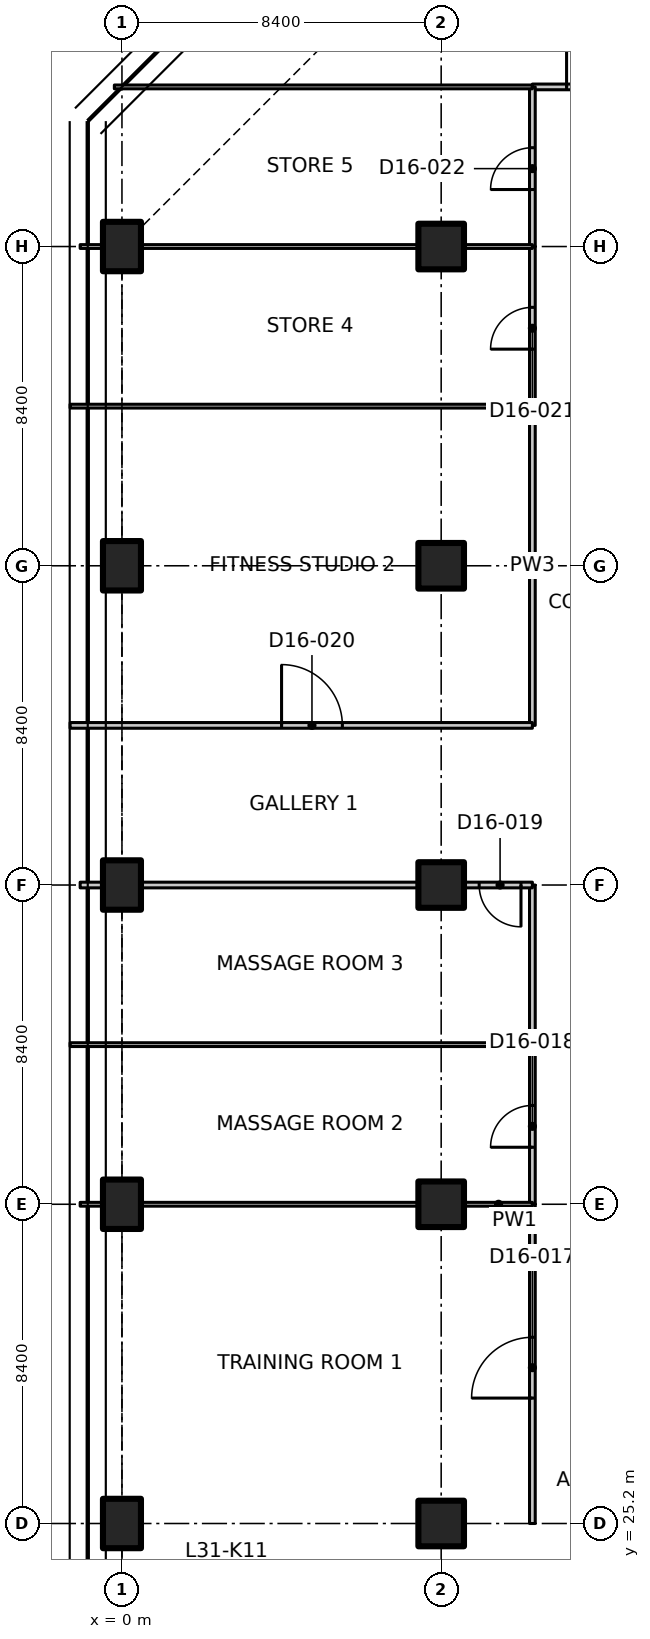
"""IFC4 building model, lengths in metres.
Left out: names, types, materials, properties, quantities, classifications, styles, units other than length and angle.
Written with IfcOpenShell. Run it as: python <this file> out.ifc"""

import sys

from ifc_helpers import new_model, si_unit, direction, frame, frame_2d, origin, origin_2d, place, context, subcontext, project, spatial, polyline, rectangle, outline, extrude, element, fill, save


model = new_model("IFC4")
c1 = context("Model", 3, precision=1e-05, world=origin(), true_north=direction((0.0, 1.0)))
c2 = subcontext(c1, "Body", "Model", "MODEL_VIEW")
j1 = project(units=[si_unit("LENGTHUNIT", "METRE"), si_unit("PLANEANGLEUNIT", "RADIAN")], contexts=[c1])
p1 = place(None, origin())
s1 = spatial("IfcSite", under=j1, at=p1, CompositionType="ELEMENT")
p2 = place(p1, origin())
s2 = spatial("IfcBuilding", under=s1, at=p2, CompositionType="ELEMENT")
p3 = place(p2, frame((0.0, 0.0, 127.7)))
s3 = spatial("IfcBuildingStorey", under=s2, at=p3, CompositionType="ELEMENT", Elevation=127.7)
for number, where, z_axis, x_axis in (
    (1, (0.0, 25.2, 0.0), (0.0, 0.0, 1.0), (1.0, 0.0, 0.0)),
    (2, (0.0, 33.6, 0.0), (0.0, 0.0, 1.0), (1.0, 0.0, 0.0)),
    (3, (0.0, 42.0, 0.0), (0.0, 0.0, 1.0), (1.0, 0.0, 0.0)),
    (4, (0.0, 50.4, 0.0), (0.0, 0.0, 1.0), (1.0, 0.0, 0.0)),
    (5, (0.0, 58.8, 0.0), (0.0, 0.0, 1.0), (1.0, 0.0, 0.0)),
):
    element("IfcColumn", number, at=place(p3, frame(where, z_axis=z_axis, x_axis=x_axis)), inside=s3, PredefinedType="COLUMN", context=c2, shape_type="SweptSolid", body=[
        extrude(rectangle(XDim=1.0, YDim=1.3, at=origin_2d()), origin(), (0.0, 0.0, 1.0), 3.35),
    ])
for number, where, z_axis, x_axis in (
    (6, (8.4, 25.2, 0.0), (0.0, 0.0, 1.0), (1.0, 0.0, 0.0)),
    (7, (8.4, 33.6, 0.0), (0.0, 0.0, 1.0), (1.0, 0.0, 0.0)),
    (8, (8.4, 42.0, 0.0), (0.0, 0.0, 1.0), (1.0, 0.0, 0.0)),
    (9, (8.4, 50.4, 0.0), (0.0, 0.0, 1.0), (1.0, 0.0, 0.0)),
    (10, (8.4, 58.8, 0.0), (0.0, 0.0, 1.0), (1.0, 0.0, 0.0)),
):
    element("IfcColumn", number, at=place(p3, frame(where, z_axis=z_axis, x_axis=x_axis)), inside=s3, PredefinedType="COLUMN", context=c2, shape_type="SweptSolid", body=[
        extrude(rectangle(XDim=1.2, YDim=1.2, at=origin_2d()), origin(), (0.0, 0.0, 1.0), 3.35),
    ])
p4 = place(p3, frame((10.8, 25.2, 0.0), z_axis=(0.0, 0.0, 1.0), x_axis=(0.0, 1.0, 0.0)))
e11 = element("IfcWall", 11, at=p4, inside=s3, PredefinedType="PARTITIONING", context=c2, shape_type="SweptSolid", body=[
    extrude(rectangle(XDim=8.4, YDim=0.15, at=frame_2d((4.2, 0.0))), origin(), (0.0, 0.0, 1.0), 3.33),
])
p5 = place(p4, frame((3.3, 0.0, 0.0)))
e12 = element("IfcOpeningElement", 12, at=p5, cuts=e11, PredefinedType="OPENING", context=c2, shape_type="SweptSolid", body=[
    extrude(rectangle(XDim=1.6, YDim=2.1, at=frame_2d((0.8, 1.05))), frame((0.0, 0.085, 0.0), z_axis=(0.0, -1.0, 0.0), x_axis=(1.0, 0.0, 0.0)), (0.0, 0.0, 1.0), 0.17),
])
p6 = place(p3, frame((10.8, 63.0, 0.0), z_axis=(0.0, 0.0, 1.0), x_axis=(1.0, 0.0, 0.0)))
e13 = element("IfcWall", 13, at=p6, inside=s3, PredefinedType="PARTITIONING", context=c2, shape_type="SweptSolid", body=[
    extrude(rectangle(XDim=3.6, YDim=0.15, at=frame_2d((1.8, 0.0))), origin(), (0.0, 0.0, 1.0), 3.33),
])
p7 = place(p6, frame((0.9, 0.0, 0.0)))
e14 = element("IfcOpeningElement", 14, at=p7, cuts=e13, PredefinedType="OPENING", context=c2, shape_type="SweptSolid", body=[
    extrude(rectangle(XDim=2.0, YDim=2.4, at=frame_2d((1.0, 1.2))), frame((0.0, 0.085, 0.0), z_axis=(0.0, -1.0, 0.0), x_axis=(1.0, 0.0, 0.0)), (0.0, 0.0, 1.0), 0.17),
])
p8 = place(p3, frame((10.8, 33.6, 0.0), z_axis=(0.0, 0.0, 1.0), x_axis=(0.0, 1.0, 0.0)))
e15 = element("IfcWall", 15, at=p8, inside=s3, PredefinedType="PARTITIONING", context=c2, shape_type="SweptSolid", body=[
    extrude(rectangle(XDim=4.2, YDim=0.15, at=frame_2d((2.1, 0.0))), origin(), (0.0, 0.0, 1.0), 3.33),
])
p9 = place(p8, frame((1.5, 0.0, 0.0)))
e16 = element("IfcOpeningElement", 16, at=p9, cuts=e15, PredefinedType="OPENING", context=c2, shape_type="SweptSolid", body=[
    extrude(rectangle(XDim=1.1, YDim=2.1, at=frame_2d((0.55, 1.05))), frame((0.0, 0.085, 0.0), z_axis=(0.0, -1.0, 0.0), x_axis=(1.0, 0.0, 0.0)), (0.0, 0.0, 1.0), 0.17),
])
p10 = place(p3, frame((10.8, 37.8, 0.0), z_axis=(0.0, 0.0, 1.0), x_axis=(0.0, 1.0, 0.0)))
e17 = element("IfcWall", 17, at=p10, inside=s3, PredefinedType="PARTITIONING", context=c2, shape_type="SweptSolid", body=[
    extrude(rectangle(XDim=4.2, YDim=0.15, at=frame_2d((2.1, 0.0))), origin(), (0.0, 0.0, 1.0), 3.33),
])
p11 = place(p3, frame((10.8, 46.2, 0.0), z_axis=(0.0, 0.0, 1.0), x_axis=(0.0, 1.0, 0.0)))
e18 = element("IfcWall", 18, at=p11, inside=s3, PredefinedType="PARTITIONING", context=c2, shape_type="SweptSolid", body=[
    extrude(rectangle(XDim=8.4, YDim=0.15, at=frame_2d((4.2, 0.0))), origin(), (0.0, 0.0, 1.0), 3.33),
])
p12 = place(p3, frame((10.8, 54.6, 0.0), z_axis=(0.0, 0.0, 1.0), x_axis=(0.0, 1.0, 0.0)))
e19 = element("IfcWall", 19, at=p12, inside=s3, PredefinedType="PARTITIONING", context=c2, shape_type="SweptSolid", body=[
    extrude(rectangle(XDim=4.2, YDim=0.15, at=frame_2d((2.1, 0.0))), origin(), (0.0, 0.0, 1.0), 3.33),
])
p13 = place(p12, frame((1.5, 0.0, 0.0)))
e20 = element("IfcOpeningElement", 20, at=p13, cuts=e19, PredefinedType="OPENING", context=c2, shape_type="SweptSolid", body=[
    extrude(rectangle(XDim=1.1, YDim=2.1, at=frame_2d((0.55, 1.05))), frame((0.0, 0.085, 0.0), z_axis=(0.0, -1.0, 0.0), x_axis=(1.0, 0.0, 0.0)), (0.0, 0.0, 1.0), 0.17),
])
p14 = place(p3, frame((10.8, 58.8, 0.0), z_axis=(0.0, 0.0, 1.0), x_axis=(0.0, 1.0, 0.0)))
e21 = element("IfcWall", 21, at=p14, inside=s3, PredefinedType="PARTITIONING", context=c2, shape_type="SweptSolid", body=[
    extrude(rectangle(XDim=4.2, YDim=0.15, at=frame_2d((2.1, 0.0))), origin(), (0.0, 0.0, 1.0), 3.33),
])
p15 = place(p14, frame((1.5, 0.0, 0.0)))
e22 = element("IfcOpeningElement", 22, at=p15, cuts=e21, PredefinedType="OPENING", context=c2, shape_type="SweptSolid", body=[
    extrude(rectangle(XDim=1.1, YDim=2.1, at=frame_2d((0.55, 1.05))), frame((0.0, 0.085, 0.0), z_axis=(0.0, -1.0, 0.0), x_axis=(1.0, 0.0, 0.0)), (0.0, 0.0, 1.0), 0.17),
])
p16 = place(p3, frame((10.8, 63.0, 0.0), z_axis=(0.0, 0.0, 1.0), x_axis=(-1.0, 0.0, 0.0)))
e23 = element("IfcWall", 23, at=p16, inside=s3, PredefinedType="PARTITIONING", context=c2, shape_type="SweptSolid", body=[
    extrude(outline(polyline([(0.0, 0.0), (11.0, 0.0), (11.0, 3.33), (7.266, 3.33), (7.264, 2.98), (5.936, 2.98), (5.934, 3.33), (0.0, 3.33), (0.0, 0.0)])), frame((0.0, 0.05, 0.0), z_axis=(0.0, -1.0, 0.0), x_axis=(1.0, 0.0, 0.0)), (0.0, 0.0, 1.0), 0.1),
])
p17 = place(p3, frame((10.8, 42.0, 0.0), z_axis=(0.0, 0.0, 1.0), x_axis=(-1.0, 0.0, 0.0)))
e24 = element("IfcWall", 24, at=p17, inside=s3, PredefinedType="PARTITIONING", context=c2, shape_type="SweptSolid", body=[
    extrude(rectangle(XDim=1.78, YDim=0.15, at=frame_2d((0.89, 0.0))), origin(), (0.0, 0.0, 1.0), 3.33),
])
p18 = place(p17, frame((0.3, 0.0, 0.0)))
e25 = element("IfcOpeningElement", 25, at=p18, cuts=e24, PredefinedType="OPENING", context=c2, shape_type="SweptSolid", body=[
    extrude(rectangle(XDim=1.1, YDim=2.1, at=frame_2d((0.55, 1.05))), frame((0.0, 0.085, 0.0), z_axis=(0.0, -1.0, 0.0), x_axis=(1.0, 0.0, 0.0)), (0.0, 0.0, 1.0), 0.17),
])
p19 = place(p3, frame((7.78, 42.0, 0.0), z_axis=(0.0, 0.0, 1.0), x_axis=(-1.0, 0.0, 0.0)))
e26 = element("IfcWall", 26, at=p19, inside=s3, PredefinedType="PARTITIONING", context=c2, shape_type="SweptSolid", body=[
    extrude(rectangle(XDim=7.26, YDim=0.15, at=frame_2d((3.63, 0.0))), origin(), (0.0, 0.0, 1.0), 3.33),
])
p20 = place(p3, frame((-0.52, 42.0, 0.0), z_axis=(0.0, 0.0, 1.0), x_axis=(-1.0, 0.0, 0.0)))
e27 = element("IfcWall", 27, at=p20, inside=s3, PredefinedType="PARTITIONING", context=c2, shape_type="SweptSolid", body=[
    extrude(rectangle(XDim=0.58, YDim=0.15, at=frame_2d((0.29, 0.0))), origin(), (0.0, 0.0, 1.0), 3.33),
])
p21 = place(p3, frame((-1.365, 46.2, 0.0), z_axis=(0.0, 0.0, 1.0), x_axis=(1.0, 0.0, 0.0)))
e28 = element("IfcWall", 28, at=p21, inside=s3, PredefinedType="PARTITIONING", context=c2, shape_type="SweptSolid", body=[
    extrude(outline(polyline([(0.0, 0.0), (12.165, 0.0), (12.165, 3.33), (1.815, 3.33), (1.813, 2.98), (0.917, 2.98), (0.915, 3.33), (0.265, 3.33), (0.0, 3.33), (0.0, 0.0)])), frame((0.0, 0.075, 0.0), z_axis=(0.0, -1.0, 0.0), x_axis=(1.0, 0.0, 0.0)), (0.0, 0.0, 1.0), 0.15),
])
p22 = place(p21, frame((5.565, 0.0, 0.0)))
e29 = element("IfcOpeningElement", 29, at=p22, cuts=e28, PredefinedType="OPENING", context=c2, shape_type="SweptSolid", body=[
    extrude(rectangle(XDim=1.6, YDim=2.1, at=frame_2d((0.8, 1.05))), frame((0.0, 0.085, 0.0), z_axis=(0.0, -1.0, 0.0), x_axis=(1.0, 0.0, 0.0)), (0.0, 0.0, 1.0), 0.17),
])
p23 = place(p3, frame((-1.1, 33.6, 0.0), z_axis=(0.0, 0.0, 1.0), x_axis=(1.0, 0.0, 0.0)))
e30 = element("IfcWall", 30, at=p23, inside=s3, PredefinedType="PARTITIONING", context=c2, shape_type="SweptSolid", body=[
    extrude(rectangle(XDim=0.58, YDim=0.1, at=frame_2d((0.29, 0.0))), origin(), (0.0, 0.0, 1.0), 3.33),
])
p24 = place(p3, frame((0.52, 33.6, 0.0), z_axis=(0.0, 0.0, 1.0), x_axis=(1.0, 0.0, 0.0)))
e31 = element("IfcWall", 31, at=p24, inside=s3, PredefinedType="PARTITIONING", context=c2, shape_type="SweptSolid", body=[
    extrude(rectangle(XDim=7.26, YDim=0.1, at=frame_2d((3.63, 0.0))), origin(), (0.0, 0.0, 1.0), 3.33),
])
p25 = place(p3, frame((9.02, 33.6, 0.0), z_axis=(0.0, 0.0, 1.0), x_axis=(1.0, 0.0, 0.0)))
e32 = element("IfcWall", 32, at=p25, inside=s3, PredefinedType="PARTITIONING", context=c2, shape_type="SweptSolid", body=[
    extrude(rectangle(XDim=1.78, YDim=0.1, at=frame_2d((0.89, 0.0))), origin(), (0.0, 0.0, 1.0), 3.33),
])
for number, where, z_axis, x_axis in (
    (33, (-1.365, 37.8, 0.0), (0.0, 0.0, 1.0), (1.0, 0.0, 0.0)),
    (34, (-1.365, 54.6, 0.0), (0.0, 0.0, 1.0), (1.0, 0.0, 0.0)),
):
    element("IfcWall", number, at=place(p3, frame(where, z_axis=z_axis, x_axis=x_axis)), inside=s3, PredefinedType="PARTITIONING", context=c2, shape_type="SweptSolid", body=[
        extrude(outline(polyline([(0.0, 0.0), (12.165, 0.0), (12.165, 3.33), (1.815, 3.33), (1.813, 2.98), (0.917, 2.98), (0.915, 3.33), (0.265, 3.33), (0.0, 3.33), (0.0, 0.0)])), frame((0.0, 0.05, 0.0), z_axis=(0.0, -1.0, 0.0), x_axis=(1.0, 0.0, 0.0)), (0.0, 0.0, 1.0), 0.1),
    ])
p26 = place(p3, frame((-1.1, 58.8, 0.0), z_axis=(0.0, 0.0, 1.0), x_axis=(1.0, 0.0, 0.0)))
e35 = element("IfcWall", 35, at=p26, inside=s3, PredefinedType="PARTITIONING", context=c2, shape_type="SweptSolid", body=[
    extrude(rectangle(XDim=0.58, YDim=0.1, at=frame_2d((0.29, 0.0))), origin(), (0.0, 0.0, 1.0), 3.33),
])
p27 = place(p3, frame((0.52, 58.8, 0.0), z_axis=(0.0, 0.0, 1.0), x_axis=(1.0, 0.0, 0.0)))
e36 = element("IfcWall", 36, at=p27, inside=s3, PredefinedType="PARTITIONING", context=c2, shape_type="SweptSolid", body=[
    extrude(outline(polyline([(0.0, 0.0), (7.26, 0.0), (7.26, 3.33), (0.146, 3.33), (0.144, 2.98), (0.0, 2.98), (0.0, 0.0)])), frame((0.0, 0.05, 0.0), z_axis=(0.0, -1.0, 0.0), x_axis=(1.0, 0.0, 0.0)), (0.0, 0.0, 1.0), 0.1),
])
p28 = place(p3, frame((9.02, 58.8, 0.0), z_axis=(0.0, 0.0, 1.0), x_axis=(1.0, 0.0, 0.0)))
e37 = element("IfcWall", 37, at=p28, inside=s3, PredefinedType="PARTITIONING", context=c2, shape_type="SweptSolid", body=[
    extrude(rectangle(XDim=1.78, YDim=0.1, at=frame_2d((0.89, 0.0))), origin(), (0.0, 0.0, 1.0), 3.33),
])
p29 = place(p7, origin())
e38 = element("IfcDoor", 38, at=p29, inside=s3, OperationType="DOUBLE_DOOR_SINGLE_SWING", PredefinedType="DOOR", context=c2, shape_type="SweptSolid", body=[
    extrude(rectangle(XDim=2.0, YDim=2.4, at=frame_2d((1.0, 1.2))), frame((0.0, 0.025, 0.0), z_axis=(0.0, -1.0, 0.0), x_axis=(1.0, 0.0, 0.0)), (0.0, 0.0, 1.0), 0.05),
])
fill(e14, e38)
p30 = place(p5, origin())
e39 = element("IfcDoor", 39, at=p30, inside=s3, OperationType="DOUBLE_DOOR_SINGLE_SWING", PredefinedType="DOOR", context=c2, shape_type="SweptSolid", body=[
    extrude(rectangle(XDim=1.6, YDim=2.1, at=frame_2d((0.8, 1.05))), frame((0.0, 0.025, 0.0), z_axis=(0.0, -1.0, 0.0), x_axis=(1.0, 0.0, 0.0)), (0.0, 0.0, 1.0), 0.05),
])
fill(e12, e39)
p31 = place(p9, origin())
e40 = element("IfcDoor", 40, at=p31, inside=s3, OperationType="SINGLE_SWING_LEFT", PredefinedType="DOOR", context=c2, shape_type="SweptSolid", body=[
    extrude(rectangle(XDim=1.1, YDim=2.1, at=frame_2d((0.55, 1.05))), frame((0.0, 0.025, 0.0), z_axis=(0.0, -1.0, 0.0), x_axis=(1.0, 0.0, 0.0)), (0.0, 0.0, 1.0), 0.05),
])
fill(e16, e40)
p32 = place(p18, origin())
e41 = element("IfcDoor", 41, at=p32, inside=s3, OperationType="SINGLE_SWING_LEFT", PredefinedType="DOOR", context=c2, shape_type="SweptSolid", body=[
    extrude(rectangle(XDim=1.1, YDim=2.1, at=frame_2d((0.55, 1.05))), frame((0.0, 0.025, 0.0), z_axis=(0.0, -1.0, 0.0), x_axis=(1.0, 0.0, 0.0)), (0.0, 0.0, 1.0), 0.05),
])
fill(e25, e41)
p33 = place(p22, origin())
e42 = element("IfcDoor", 42, at=p33, inside=s3, OperationType="DOUBLE_DOOR_SINGLE_SWING", PredefinedType="DOOR", context=c2, shape_type="SweptSolid", body=[
    extrude(rectangle(XDim=1.6, YDim=2.1, at=frame_2d((0.8, 1.05))), frame((0.0, 0.025, 0.0), z_axis=(0.0, -1.0, 0.0), x_axis=(1.0, 0.0, 0.0)), (0.0, 0.0, 1.0), 0.05),
])
fill(e29, e42)
p34 = place(p13, origin())
e43 = element("IfcDoor", 43, at=p34, inside=s3, OperationType="SINGLE_SWING_LEFT", PredefinedType="DOOR", context=c2, shape_type="SweptSolid", body=[
    extrude(rectangle(XDim=1.1, YDim=2.1, at=frame_2d((0.55, 1.05))), frame((0.0, 0.025, 0.0), z_axis=(0.0, -1.0, 0.0), x_axis=(1.0, 0.0, 0.0)), (0.0, 0.0, 1.0), 0.05),
])
fill(e20, e43)
p35 = place(p15, origin())
e44 = element("IfcDoor", 44, at=p35, inside=s3, OperationType="SINGLE_SWING_LEFT", PredefinedType="DOOR", context=c2, shape_type="SweptSolid", body=[
    extrude(rectangle(XDim=1.1, YDim=2.1, at=frame_2d((0.55, 1.05))), frame((0.0, 0.025, 0.0), z_axis=(0.0, -1.0, 0.0), x_axis=(1.0, 0.0, 0.0)), (0.0, 0.0, 1.0), 0.05),
])
fill(e22, e44)
save(model, sys.argv[1])
